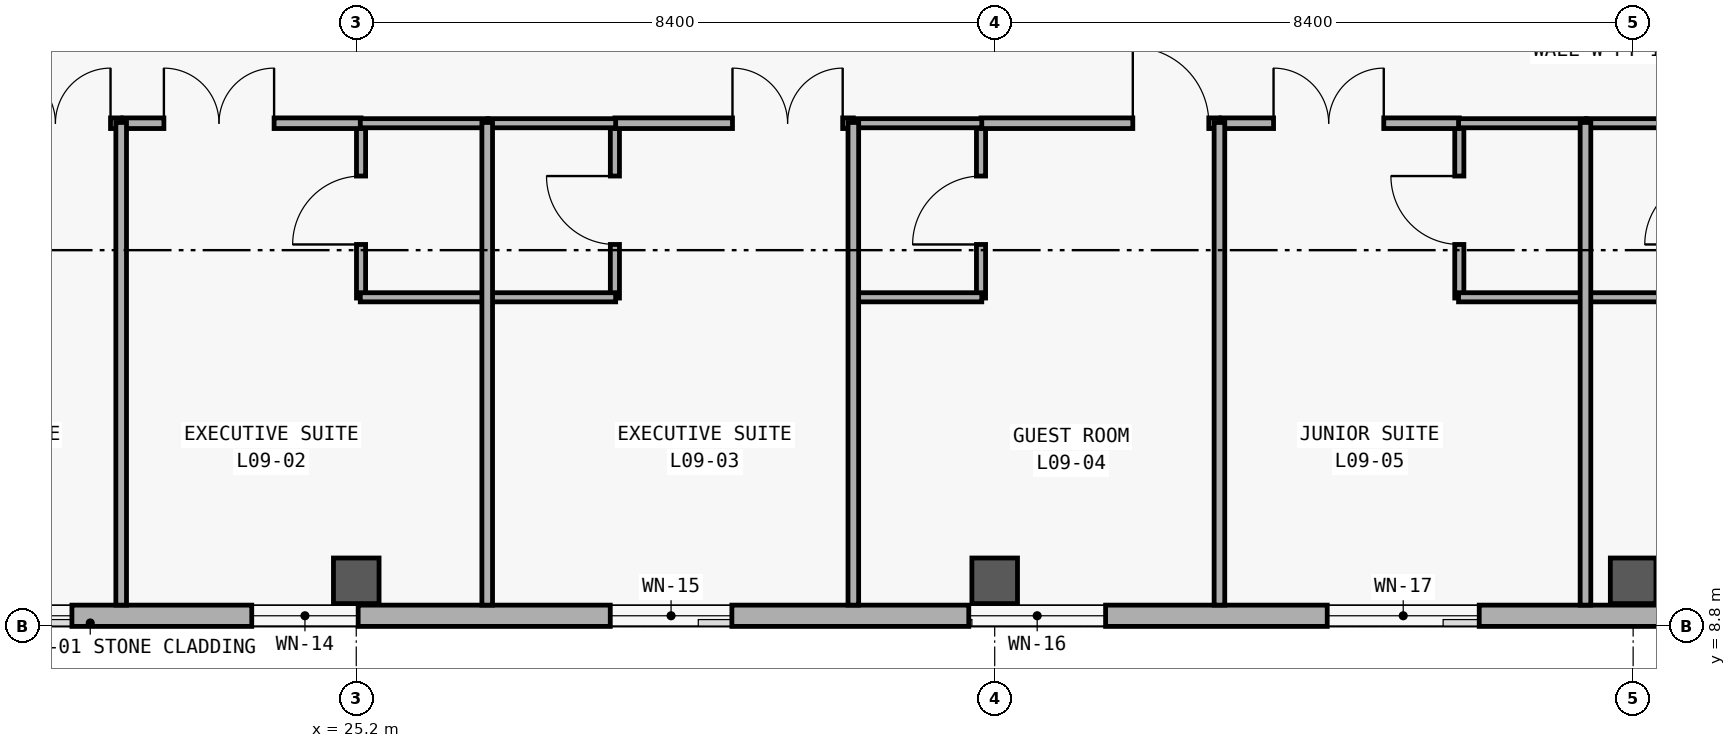
"""IFC4 building model, lengths in metres.
Left out: names, types, materials, properties, quantities, classifications, styles, units other than length and angle.
Written with IfcOpenShell. Run it as: python <this file> out.ifc"""

import sys

from ifc_helpers import new_model, si_unit, direction, frame, frame_2d, origin, origin_2d, place, context, subcontext, project, spatial, rectangle, extrude, element, fill, save


model = new_model("IFC4")
c1 = context("Model", 3, precision=1e-05, world=origin(), true_north=direction((0.0, 1.0)))
c2 = subcontext(c1, "Body", "Model", "MODEL_VIEW")
j1 = project(units=[si_unit("LENGTHUNIT", "METRE"), si_unit("PLANEANGLEUNIT", "RADIAN")], contexts=[c1])
p1 = place(None, origin())
s1 = spatial("IfcSite", under=j1, at=p1, CompositionType="ELEMENT")
p2 = place(p1, origin())
s2 = spatial("IfcBuilding", under=s1, at=p2, CompositionType="ELEMENT")
p3 = place(p2, frame((0.0, 0.0, 37.2)))
s3 = spatial("IfcBuildingStorey", under=s2, at=p3, CompositionType="ELEMENT", Elevation=37.2)
for number, where, z_axis, x_axis in (
    (1, (25.2, 9.4, 0.0), (0.0, 0.0, 1.0), (1.0, 0.0, 0.0)),
    (2, (33.6, 9.4, 0.0), (0.0, 0.0, 1.0), (1.0, 0.0, 0.0)),
    (3, (42.0, 9.4, 0.0), (0.0, 0.0, 1.0), (1.0, 0.0, 0.0)),
):
    element("IfcColumn", number, at=place(p3, frame(where, z_axis=z_axis, x_axis=x_axis)), inside=s3, PredefinedType="COLUMN", context=c2, shape_type="SweptSolid", body=[
        extrude(rectangle(XDim=0.6, YDim=0.6, at=origin_2d()), origin(), (0.0, 0.0, 1.0), 3.6),
    ])
p4 = place(p3, frame((75.32, 8.94, 0.0), z_axis=(0.0, 0.0, 1.0), x_axis=(-1.0, 0.0, 0.0)))
e4 = element("IfcWall", 4, at=p4, inside=s3, PredefinedType="SOLIDWALL", context=c2, shape_type="SweptSolid", body=[
    extrude(rectangle(XDim=58.24, YDim=0.28, at=frame_2d((29.12, 0.0))), origin(), (0.0, 0.0, 1.0), 3.34),
])
p5 = place(p4, frame((53.861, 0.0, 0.85)))
e5 = element("IfcOpeningElement", 5, at=p5, cuts=e4, PredefinedType="OPENING", context=c2, shape_type="SweptSolid", body=[
    extrude(rectangle(XDim=3.5, YDim=2.0, at=frame_2d((1.75, 1.0))), frame((0.0, 0.15, 0.0), z_axis=(0.0, -1.0, 0.0), x_axis=(1.0, 0.0, 0.0)), (0.0, 0.0, 1.0), 0.3),
])
p6 = place(p4, frame((50.095, 0.0, 0.85)))
e6 = element("IfcOpeningElement", 6, at=p6, cuts=e4, PredefinedType="OPENING", context=c2, shape_type="SweptSolid", body=[
    extrude(rectangle(XDim=1.4, YDim=1.6, at=frame_2d((0.7, 0.8))), frame((0.0, 0.15, 0.0), z_axis=(0.0, -1.0, 0.0), x_axis=(1.0, 0.0, 0.0)), (0.0, 0.0, 1.0), 0.3),
])
p7 = place(p4, frame((45.178, 0.0, 0.85)))
e7 = element("IfcOpeningElement", 7, at=p7, cuts=e4, PredefinedType="OPENING", context=c2, shape_type="SweptSolid", body=[
    extrude(rectangle(XDim=1.6, YDim=1.6, at=frame_2d((0.8, 0.8))), frame((0.0, 0.15, 0.0), z_axis=(0.0, -1.0, 0.0), x_axis=(1.0, 0.0, 0.0)), (0.0, 0.0, 1.0), 0.3),
])
p8 = place(p4, frame((40.261, 0.0, 0.85)))
e8 = element("IfcOpeningElement", 8, at=p8, cuts=e4, PredefinedType="OPENING", context=c2, shape_type="SweptSolid", body=[
    extrude(rectangle(XDim=1.8, YDim=1.6, at=frame_2d((0.9, 0.8))), frame((0.0, 0.15, 0.0), z_axis=(0.0, -1.0, 0.0), x_axis=(1.0, 0.0, 0.0)), (0.0, 0.0, 1.0), 0.3),
])
p9 = place(p4, frame((35.345, 0.0, 0.85)))
e9 = element("IfcOpeningElement", 9, at=p9, cuts=e4, PredefinedType="OPENING", context=c2, shape_type="SweptSolid", body=[
    extrude(rectangle(XDim=2.0, YDim=1.65, at=frame_2d((1.0, 0.825))), frame((0.0, 0.15, 0.0), z_axis=(0.0, -1.0, 0.0), x_axis=(1.0, 0.0, 0.0)), (0.0, 0.0, 1.0), 0.3),
])
p10 = place(p4, frame((30.428, 0.0, 0.85)))
e10 = element("IfcOpeningElement", 10, at=p10, cuts=e4, PredefinedType="OPENING", context=c2, shape_type="SweptSolid", body=[
    extrude(rectangle(XDim=2.2, YDim=1.65, at=frame_2d((1.1, 0.825))), frame((0.0, 0.15, 0.0), z_axis=(0.0, -1.0, 0.0), x_axis=(1.0, 0.0, 0.0)), (0.0, 0.0, 1.0), 0.3),
])
p11 = place(p4, frame((25.411, 0.0, 0.85)))
e11 = element("IfcOpeningElement", 11, at=p11, cuts=e4, PredefinedType="OPENING", context=c2, shape_type="SweptSolid", body=[
    extrude(rectangle(XDim=2.6, YDim=2.2, at=frame_2d((1.3, 1.1))), frame((0.0, 0.15, 0.0), z_axis=(0.0, -1.0, 0.0), x_axis=(1.0, 0.0, 0.0)), (0.0, 0.0, 1.0), 0.3),
])
p12 = place(p4, frame((20.345, 0.0, 0.85)))
e12 = element("IfcOpeningElement", 12, at=p12, cuts=e4, PredefinedType="OPENING", context=c2, shape_type="SweptSolid", body=[
    extrude(rectangle(XDim=3.1, YDim=2.2, at=frame_2d((1.55, 1.1))), frame((0.0, 0.15, 0.0), z_axis=(0.0, -1.0, 0.0), x_axis=(1.0, 0.0, 0.0)), (0.0, 0.0, 1.0), 0.3),
])
p13 = place(p4, frame((15.278, 0.0, 0.85)))
e13 = element("IfcOpeningElement", 13, at=p13, cuts=e4, PredefinedType="OPENING", context=c2, shape_type="SweptSolid", body=[
    extrude(rectangle(XDim=3.6, YDim=2.3, at=frame_2d((1.8, 1.15))), frame((0.0, 0.15, 0.0), z_axis=(0.0, -1.0, 0.0), x_axis=(1.0, 0.0, 0.0)), (0.0, 0.0, 1.0), 0.3),
])
p14 = place(p4, frame((11.636, 0.0, 0.85)))
e14 = element("IfcOpeningElement", 14, at=p14, cuts=e4, PredefinedType="OPENING", context=c2, shape_type="SweptSolid", body=[
    extrude(rectangle(XDim=1.25, YDim=1.45, at=frame_2d((0.625, 0.725))), frame((0.0, 0.15, 0.0), z_axis=(0.0, -1.0, 0.0), x_axis=(1.0, 0.0, 0.0)), (0.0, 0.0, 1.0), 0.3),
])
p15 = place(p4, frame((6.77, 0.0, 0.85)))
e15 = element("IfcOpeningElement", 15, at=p15, cuts=e4, PredefinedType="OPENING", context=c2, shape_type="SweptSolid", body=[
    extrude(rectangle(XDim=1.35, YDim=1.55, at=frame_2d((0.675, 0.775))), frame((0.0, 0.15, 0.0), z_axis=(0.0, -1.0, 0.0), x_axis=(1.0, 0.0, 0.0)), (0.0, 0.0, 1.0), 0.3),
])
p16 = place(p4, frame((1.904, 0.0, 0.85)))
e16 = element("IfcOpeningElement", 16, at=p16, cuts=e4, PredefinedType="OPENING", context=c2, shape_type="SweptSolid", body=[
    extrude(rectangle(XDim=1.45, YDim=1.65, at=frame_2d((0.725, 0.825))), frame((0.0, 0.15, 0.0), z_axis=(0.0, -1.0, 0.0), x_axis=(1.0, 0.0, 0.0)), (0.0, 0.0, 1.0), 0.3),
])
p17 = place(p3, frame((25.263, 13.12, 0.0), z_axis=(0.0, 0.0, 1.0), x_axis=(0.0, 1.0, 0.0)))
e17 = element("IfcWall", 17, at=p17, inside=s3, PredefinedType="PARTITIONING", context=c2, shape_type="SweptSolid", body=[
    extrude(rectangle(XDim=2.31, YDim=0.12, at=frame_2d((1.155, 0.0))), origin(), (0.0, 0.0, 1.0), 2.48),
])
p18 = place(p17, frame((0.705, 0.0, 0.0)))
e18 = element("IfcOpeningElement", 18, at=p18, cuts=e17, PredefinedType="OPENING", context=c2, shape_type="SweptSolid", body=[
    extrude(rectangle(XDim=0.9, YDim=2.18, at=frame_2d((0.45, 1.09))), frame((0.0, 0.07, 0.0), z_axis=(0.0, -1.0, 0.0), x_axis=(1.0, 0.0, 0.0)), (0.0, 0.0, 1.0), 0.14),
])
p19 = place(p3, frame((28.603, 13.12, 0.0), z_axis=(0.0, 0.0, 1.0), x_axis=(0.0, 1.0, 0.0)))
e19 = element("IfcWall", 19, at=p19, inside=s3, PredefinedType="PARTITIONING", context=c2, shape_type="SweptSolid", body=[
    extrude(rectangle(XDim=2.31, YDim=0.12, at=frame_2d((1.155, 0.0))), origin(), (0.0, 0.0, 1.0), 2.48),
])
p20 = place(p19, frame((0.705, 0.0, 0.0)))
e20 = element("IfcOpeningElement", 20, at=p20, cuts=e19, PredefinedType="OPENING", context=c2, shape_type="SweptSolid", body=[
    extrude(rectangle(XDim=0.9, YDim=2.18, at=frame_2d((0.45, 1.09))), frame((0.0, 0.07, 0.0), z_axis=(0.0, -1.0, 0.0), x_axis=(1.0, 0.0, 0.0)), (0.0, 0.0, 1.0), 0.14),
])
p21 = place(p3, frame((33.42, 13.12, 0.0), z_axis=(0.0, 0.0, 1.0), x_axis=(0.0, 1.0, 0.0)))
e21 = element("IfcWall", 21, at=p21, inside=s3, PredefinedType="PARTITIONING", context=c2, shape_type="SweptSolid", body=[
    extrude(rectangle(XDim=2.31, YDim=0.12, at=frame_2d((1.155, 0.0))), origin(), (0.0, 0.0, 1.0), 2.48),
])
p22 = place(p21, frame((0.705, 0.0, 0.0)))
e22 = element("IfcOpeningElement", 22, at=p22, cuts=e21, PredefinedType="OPENING", context=c2, shape_type="SweptSolid", body=[
    extrude(rectangle(XDim=0.9, YDim=2.18, at=frame_2d((0.45, 1.09))), frame((0.0, 0.07, 0.0), z_axis=(0.0, -1.0, 0.0), x_axis=(1.0, 0.0, 0.0)), (0.0, 0.0, 1.0), 0.14),
])
p23 = place(p3, frame((39.713, 13.12, 0.0), z_axis=(0.0, 0.0, 1.0), x_axis=(0.0, 1.0, 0.0)))
e23 = element("IfcWall", 23, at=p23, inside=s3, PredefinedType="PARTITIONING", context=c2, shape_type="SweptSolid", body=[
    extrude(rectangle(XDim=2.31, YDim=0.12, at=frame_2d((1.155, 0.0))), origin(), (0.0, 0.0, 1.0), 2.48),
])
p24 = place(p23, frame((0.705, 0.0, 0.0)))
e24 = element("IfcOpeningElement", 24, at=p24, cuts=e23, PredefinedType="OPENING", context=c2, shape_type="SweptSolid", body=[
    extrude(rectangle(XDim=0.9, YDim=2.18, at=frame_2d((0.45, 1.09))), frame((0.0, 0.07, 0.0), z_axis=(0.0, -1.0, 0.0), x_axis=(1.0, 0.0, 0.0)), (0.0, 0.0, 1.0), 0.14),
])
p25 = place(p3, frame((18.97, 15.42, 0.0), z_axis=(0.0, 0.0, 1.0), x_axis=(1.0, 0.0, 0.0)))
e25 = element("IfcWall", 25, at=p25, inside=s3, PredefinedType="PARTITIONING", context=c2, shape_type="SweptSolid", body=[
    extrude(rectangle(XDim=3.137, YDim=0.14, at=frame_2d((1.568, 0.0))), origin(), (0.0, 0.0, 1.0), 2.48),
])
p26 = place(p25, frame((1.547, 0.0, 0.0)))
e26 = element("IfcOpeningElement", 26, at=p26, cuts=e25, PredefinedType="OPENING", context=c2, shape_type="SweptSolid", body=[
    extrude(rectangle(XDim=1.45, YDim=2.3, at=frame_2d((0.725, 1.15))), frame((0.0, 0.08, 0.0), z_axis=(0.0, -1.0, 0.0), x_axis=(1.0, 0.0, 0.0)), (0.0, 0.0, 1.0), 0.16),
])
p27 = place(p3, frame((22.127, 15.42, 0.0), z_axis=(0.0, 0.0, 1.0), x_axis=(1.0, 0.0, 0.0)))
e27 = element("IfcWall", 27, at=p27, inside=s3, PredefinedType="PARTITIONING", context=c2, shape_type="SweptSolid", body=[
    extrude(rectangle(XDim=3.136, YDim=0.14, at=frame_2d((1.568, 0.0))), origin(), (0.0, 0.0, 1.0), 2.48),
])
p28 = place(p27, frame((0.542, 0.0, 0.0)))
e28 = element("IfcOpeningElement", 28, at=p28, cuts=e27, PredefinedType="OPENING", context=c2, shape_type="SweptSolid", body=[
    extrude(rectangle(XDim=1.45, YDim=2.3, at=frame_2d((0.725, 1.15))), frame((0.0, 0.08, 0.0), z_axis=(0.0, -1.0, 0.0), x_axis=(1.0, 0.0, 0.0)), (0.0, 0.0, 1.0), 0.16),
])
p29 = place(p3, frame((28.603, 15.42, 0.0), z_axis=(0.0, 0.0, 1.0), x_axis=(1.0, 0.0, 0.0)))
e29 = element("IfcWall", 29, at=p29, inside=s3, PredefinedType="PARTITIONING", context=c2, shape_type="SweptSolid", body=[
    extrude(rectangle(XDim=3.137, YDim=0.14, at=frame_2d((1.568, 0.0))), origin(), (0.0, 0.0, 1.0), 2.48),
])
p30 = place(p29, frame((1.547, 0.0, 0.0)))
e30 = element("IfcOpeningElement", 30, at=p30, cuts=e29, PredefinedType="OPENING", context=c2, shape_type="SweptSolid", body=[
    extrude(rectangle(XDim=1.45, YDim=2.3, at=frame_2d((0.725, 1.15))), frame((0.0, 0.08, 0.0), z_axis=(0.0, -1.0, 0.0), x_axis=(1.0, 0.0, 0.0)), (0.0, 0.0, 1.0), 0.16),
])
p31 = place(p3, frame((33.42, 15.42, 0.0), z_axis=(0.0, 0.0, 1.0), x_axis=(1.0, 0.0, 0.0)))
e31 = element("IfcWall", 31, at=p31, inside=s3, PredefinedType="PARTITIONING", context=c2, shape_type="SweptSolid", body=[
    extrude(rectangle(XDim=3.137, YDim=0.14, at=frame_2d((1.568, 0.0))), origin(), (0.0, 0.0, 1.0), 2.48),
])
p32 = place(p31, frame((1.997, 0.0, 0.0)))
e32 = element("IfcOpeningElement", 32, at=p32, cuts=e31, PredefinedType="OPENING", context=c2, shape_type="SweptSolid", body=[
    extrude(rectangle(XDim=1.0, YDim=2.28, at=frame_2d((0.5, 1.14))), frame((0.0, 0.08, 0.0), z_axis=(0.0, -1.0, 0.0), x_axis=(1.0, 0.0, 0.0)), (0.0, 0.0, 1.0), 0.16),
])
p33 = place(p3, frame((36.577, 15.42, 0.0), z_axis=(0.0, 0.0, 1.0), x_axis=(1.0, 0.0, 0.0)))
e33 = element("IfcWall", 33, at=p33, inside=s3, PredefinedType="PARTITIONING", context=c2, shape_type="SweptSolid", body=[
    extrude(rectangle(XDim=3.136, YDim=0.14, at=frame_2d((1.568, 0.0))), origin(), (0.0, 0.0, 1.0), 2.48),
])
p34 = place(p33, frame((0.692, 0.0, 0.0)))
e34 = element("IfcOpeningElement", 34, at=p34, cuts=e33, PredefinedType="OPENING", context=c2, shape_type="SweptSolid", body=[
    extrude(rectangle(XDim=1.45, YDim=2.3, at=frame_2d((0.725, 1.15))), frame((0.0, 0.08, 0.0), z_axis=(0.0, -1.0, 0.0), x_axis=(1.0, 0.0, 0.0)), (0.0, 0.0, 1.0), 0.16),
])
for number, where, z_axis, x_axis in (
    (35, (25.253, 13.13, 0.0), (0.0, 0.0, 1.0), (1.0, 0.0, 0.0)),
    (36, (25.253, 15.42, 0.0), (0.0, 0.0, 1.0), (1.0, 0.0, 0.0)),
):
    element("IfcWall", number, at=place(p3, frame(where, z_axis=z_axis, x_axis=x_axis)), inside=s3, PredefinedType="PARTITIONING", context=c2, shape_type="SweptSolid", body=[
        extrude(rectangle(XDim=1.68, YDim=0.12, at=frame_2d((0.84, 0.0))), origin(), (0.0, 0.0, 1.0), 2.48),
    ])
for number, where, z_axis, x_axis in (
    (37, (26.933, 13.13, 0.0), (0.0, 0.0, 1.0), (1.0, 0.0, 0.0)),
    (38, (26.933, 15.42, 0.0), (0.0, 0.0, 1.0), (1.0, 0.0, 0.0)),
    (39, (31.75, 13.13, 0.0), (0.0, 0.0, 1.0), (1.0, 0.0, 0.0)),
    (40, (31.75, 15.42, 0.0), (0.0, 0.0, 1.0), (1.0, 0.0, 0.0)),
):
    element("IfcWall", number, at=place(p3, frame(where, z_axis=z_axis, x_axis=x_axis)), inside=s3, PredefinedType="PARTITIONING", context=c2, shape_type="SweptSolid", body=[
        extrude(rectangle(XDim=1.68, YDim=0.12, at=frame_2d((0.84, 0.0))), origin(), (0.0, 0.0, 1.0), 2.48),
    ])
for number, where, z_axis, x_axis in (
    (41, (39.703, 13.13, 0.0), (0.0, 0.0, 1.0), (1.0, 0.0, 0.0)),
    (42, (39.703, 15.42, 0.0), (0.0, 0.0, 1.0), (1.0, 0.0, 0.0)),
):
    element("IfcWall", number, at=place(p3, frame(where, z_axis=z_axis, x_axis=x_axis)), inside=s3, PredefinedType="PARTITIONING", context=c2, shape_type="SweptSolid", body=[
        extrude(rectangle(XDim=1.68, YDim=0.12, at=frame_2d((0.84, 0.0))), origin(), (0.0, 0.0, 1.0), 2.48),
    ])
p35 = place(p3, frame((41.383, 13.13, 0.0), z_axis=(0.0, 0.0, 1.0), x_axis=(1.0, 0.0, 0.0)))
e43 = element("IfcWall", 43, at=p35, inside=s3, PredefinedType="PARTITIONING", context=c2, shape_type="SweptSolid", body=[
    extrude(rectangle(XDim=1.68, YDim=0.12, at=frame_2d((0.84, 0.0))), origin(), (0.0, 0.0, 1.0), 2.48),
])
p36 = place(p3, frame((41.383, 15.42, 0.0), z_axis=(0.0, 0.0, 1.0), x_axis=(1.0, 0.0, 0.0)))
e44 = element("IfcWall", 44, at=p36, inside=s3, PredefinedType="PARTITIONING", context=c2, shape_type="SweptSolid", body=[
    extrude(rectangle(XDim=1.67, YDim=0.12, at=frame_2d((0.835, 0.0))), origin(), (0.0, 0.0, 1.0), 2.48),
])
for number, where, z_axis, x_axis in (
    (45, (22.107, 9.08, 0.0), (0.0, 0.0, 1.0), (0.0, 1.0, 0.0)),
    (46, (26.923, 9.08, 0.0), (0.0, 0.0, 1.0), (0.0, 1.0, 0.0)),
    (47, (31.74, 9.08, 0.0), (0.0, 0.0, 1.0), (0.0, 1.0, 0.0)),
    (48, (36.557, 9.08, 0.0), (0.0, 0.0, 1.0), (0.0, 1.0, 0.0)),
    (49, (41.373, 9.08, 0.0), (0.0, 0.0, 1.0), (0.0, 1.0, 0.0)),
):
    element("IfcWall", number, at=place(p3, frame(where, z_axis=z_axis, x_axis=x_axis)), inside=s3, PredefinedType="PARTITIONING", context=c2, shape_type="SweptSolid", body=[
        extrude(rectangle(XDim=6.35, YDim=0.14, at=frame_2d((3.175, 0.0))), origin(), (0.0, 0.0, 1.0), 2.48),
    ])
p37 = place(p5, origin())
e50 = element("IfcWindow", 50, at=p37, inside=s3, PartitioningType="SINGLE_PANEL", PredefinedType="WINDOW", context=c2, shape_type="SweptSolid", body=[
    extrude(rectangle(XDim=3.5, YDim=2.0, at=frame_2d((1.75, 1.0))), frame((0.0, 0.03, 0.0), z_axis=(0.0, -1.0, 0.0), x_axis=(1.0, 0.0, 0.0)), (0.0, 0.0, 1.0), 0.06),
])
fill(e5, e50)
p38 = place(p6, origin())
e51 = element("IfcWindow", 51, at=p38, inside=s3, PartitioningType="SINGLE_PANEL", PredefinedType="WINDOW", context=c2, shape_type="SweptSolid", body=[
    extrude(rectangle(XDim=1.4, YDim=1.6, at=frame_2d((0.7, 0.8))), frame((0.0, 0.03, 0.0), z_axis=(0.0, -1.0, 0.0), x_axis=(1.0, 0.0, 0.0)), (0.0, 0.0, 1.0), 0.06),
])
fill(e6, e51)
p39 = place(p7, origin())
e52 = element("IfcWindow", 52, at=p39, inside=s3, PartitioningType="SINGLE_PANEL", PredefinedType="WINDOW", context=c2, shape_type="SweptSolid", body=[
    extrude(rectangle(XDim=1.6, YDim=1.6, at=frame_2d((0.8, 0.8))), frame((0.0, 0.03, 0.0), z_axis=(0.0, -1.0, 0.0), x_axis=(1.0, 0.0, 0.0)), (0.0, 0.0, 1.0), 0.06),
])
fill(e7, e52)
p40 = place(p8, origin())
e53 = element("IfcWindow", 53, at=p40, inside=s3, PartitioningType="SINGLE_PANEL", PredefinedType="WINDOW", context=c2, shape_type="SweptSolid", body=[
    extrude(rectangle(XDim=1.8, YDim=1.6, at=frame_2d((0.9, 0.8))), frame((0.0, 0.03, 0.0), z_axis=(0.0, -1.0, 0.0), x_axis=(1.0, 0.0, 0.0)), (0.0, 0.0, 1.0), 0.06),
])
fill(e8, e53)
p41 = place(p9, origin())
e54 = element("IfcWindow", 54, at=p41, inside=s3, PartitioningType="SINGLE_PANEL", PredefinedType="WINDOW", context=c2, shape_type="SweptSolid", body=[
    extrude(rectangle(XDim=2.0, YDim=1.65, at=frame_2d((1.0, 0.825))), frame((0.0, 0.03, 0.0), z_axis=(0.0, -1.0, 0.0), x_axis=(1.0, 0.0, 0.0)), (0.0, 0.0, 1.0), 0.06),
])
fill(e9, e54)
p42 = place(p18, origin())
e55 = element("IfcDoor", 55, at=p42, inside=s3, OperationType="SINGLE_SWING_LEFT", PredefinedType="DOOR", context=c2, shape_type="SweptSolid", body=[
    extrude(rectangle(XDim=0.9, YDim=2.18, at=frame_2d((0.45, 1.09))), frame((0.0, 0.025, 0.0), z_axis=(0.0, -1.0, 0.0), x_axis=(1.0, 0.0, 0.0)), (0.0, 0.0, 1.0), 0.05),
])
fill(e18, e55)
p43 = place(p20, origin())
e56 = element("IfcDoor", 56, at=p43, inside=s3, OperationType="SINGLE_SWING_RIGHT", PredefinedType="DOOR", context=c2, shape_type="SweptSolid", body=[
    extrude(rectangle(XDim=0.9, YDim=2.18, at=frame_2d((0.45, 1.09))), frame((0.0, 0.025, 0.0), z_axis=(0.0, -1.0, 0.0), x_axis=(1.0, 0.0, 0.0)), (0.0, 0.0, 1.0), 0.05),
])
fill(e20, e56)
p44 = place(p22, origin())
e57 = element("IfcDoor", 57, at=p44, inside=s3, OperationType="SINGLE_SWING_LEFT", PredefinedType="DOOR", context=c2, shape_type="SweptSolid", body=[
    extrude(rectangle(XDim=0.9, YDim=2.18, at=frame_2d((0.45, 1.09))), frame((0.0, 0.025, 0.0), z_axis=(0.0, -1.0, 0.0), x_axis=(1.0, 0.0, 0.0)), (0.0, 0.0, 1.0), 0.05),
])
fill(e22, e57)
p45 = place(p24, origin())
e58 = element("IfcDoor", 58, at=p45, inside=s3, OperationType="SINGLE_SWING_RIGHT", PredefinedType="DOOR", context=c2, shape_type="SweptSolid", body=[
    extrude(rectangle(XDim=0.9, YDim=2.18, at=frame_2d((0.45, 1.09))), frame((0.0, 0.025, 0.0), z_axis=(0.0, -1.0, 0.0), x_axis=(1.0, 0.0, 0.0)), (0.0, 0.0, 1.0), 0.05),
])
fill(e24, e58)
p46 = place(p26, origin())
e59 = element("IfcDoor", 59, at=p46, inside=s3, OperationType="DOUBLE_DOOR_SINGLE_SWING", PredefinedType="DOOR", context=c2, shape_type="SweptSolid", body=[
    extrude(rectangle(XDim=1.45, YDim=2.3, at=frame_2d((0.725, 1.15))), frame((0.0, 0.025, 0.0), z_axis=(0.0, -1.0, 0.0), x_axis=(1.0, 0.0, 0.0)), (0.0, 0.0, 1.0), 0.05),
])
fill(e26, e59)
p47 = place(p28, origin())
e60 = element("IfcDoor", 60, at=p47, inside=s3, OperationType="DOUBLE_DOOR_SINGLE_SWING", PredefinedType="DOOR", context=c2, shape_type="SweptSolid", body=[
    extrude(rectangle(XDim=1.45, YDim=2.3, at=frame_2d((0.725, 1.15))), frame((0.0, 0.025, 0.0), z_axis=(0.0, -1.0, 0.0), x_axis=(1.0, 0.0, 0.0)), (0.0, 0.0, 1.0), 0.05),
])
fill(e28, e60)
p48 = place(p30, origin())
e61 = element("IfcDoor", 61, at=p48, inside=s3, OperationType="DOUBLE_DOOR_SINGLE_SWING", PredefinedType="DOOR", context=c2, shape_type="SweptSolid", body=[
    extrude(rectangle(XDim=1.45, YDim=2.3, at=frame_2d((0.725, 1.15))), frame((0.0, 0.025, 0.0), z_axis=(0.0, -1.0, 0.0), x_axis=(1.0, 0.0, 0.0)), (0.0, 0.0, 1.0), 0.05),
])
fill(e30, e61)
p49 = place(p32, origin())
e62 = element("IfcDoor", 62, at=p49, inside=s3, OperationType="SINGLE_SWING_LEFT", PredefinedType="DOOR", context=c2, shape_type="SweptSolid", body=[
    extrude(rectangle(XDim=1.0, YDim=2.28, at=frame_2d((0.5, 1.14))), frame((0.0, 0.025, 0.0), z_axis=(0.0, -1.0, 0.0), x_axis=(1.0, 0.0, 0.0)), (0.0, 0.0, 1.0), 0.05),
])
fill(e32, e62)
p50 = place(p34, origin())
e63 = element("IfcDoor", 63, at=p50, inside=s3, OperationType="DOUBLE_DOOR_SINGLE_SWING", PredefinedType="DOOR", context=c2, shape_type="SweptSolid", body=[
    extrude(rectangle(XDim=1.45, YDim=2.3, at=frame_2d((0.725, 1.15))), frame((0.0, 0.025, 0.0), z_axis=(0.0, -1.0, 0.0), x_axis=(1.0, 0.0, 0.0)), (0.0, 0.0, 1.0), 0.05),
])
fill(e34, e63)
save(model, sys.argv[1])
